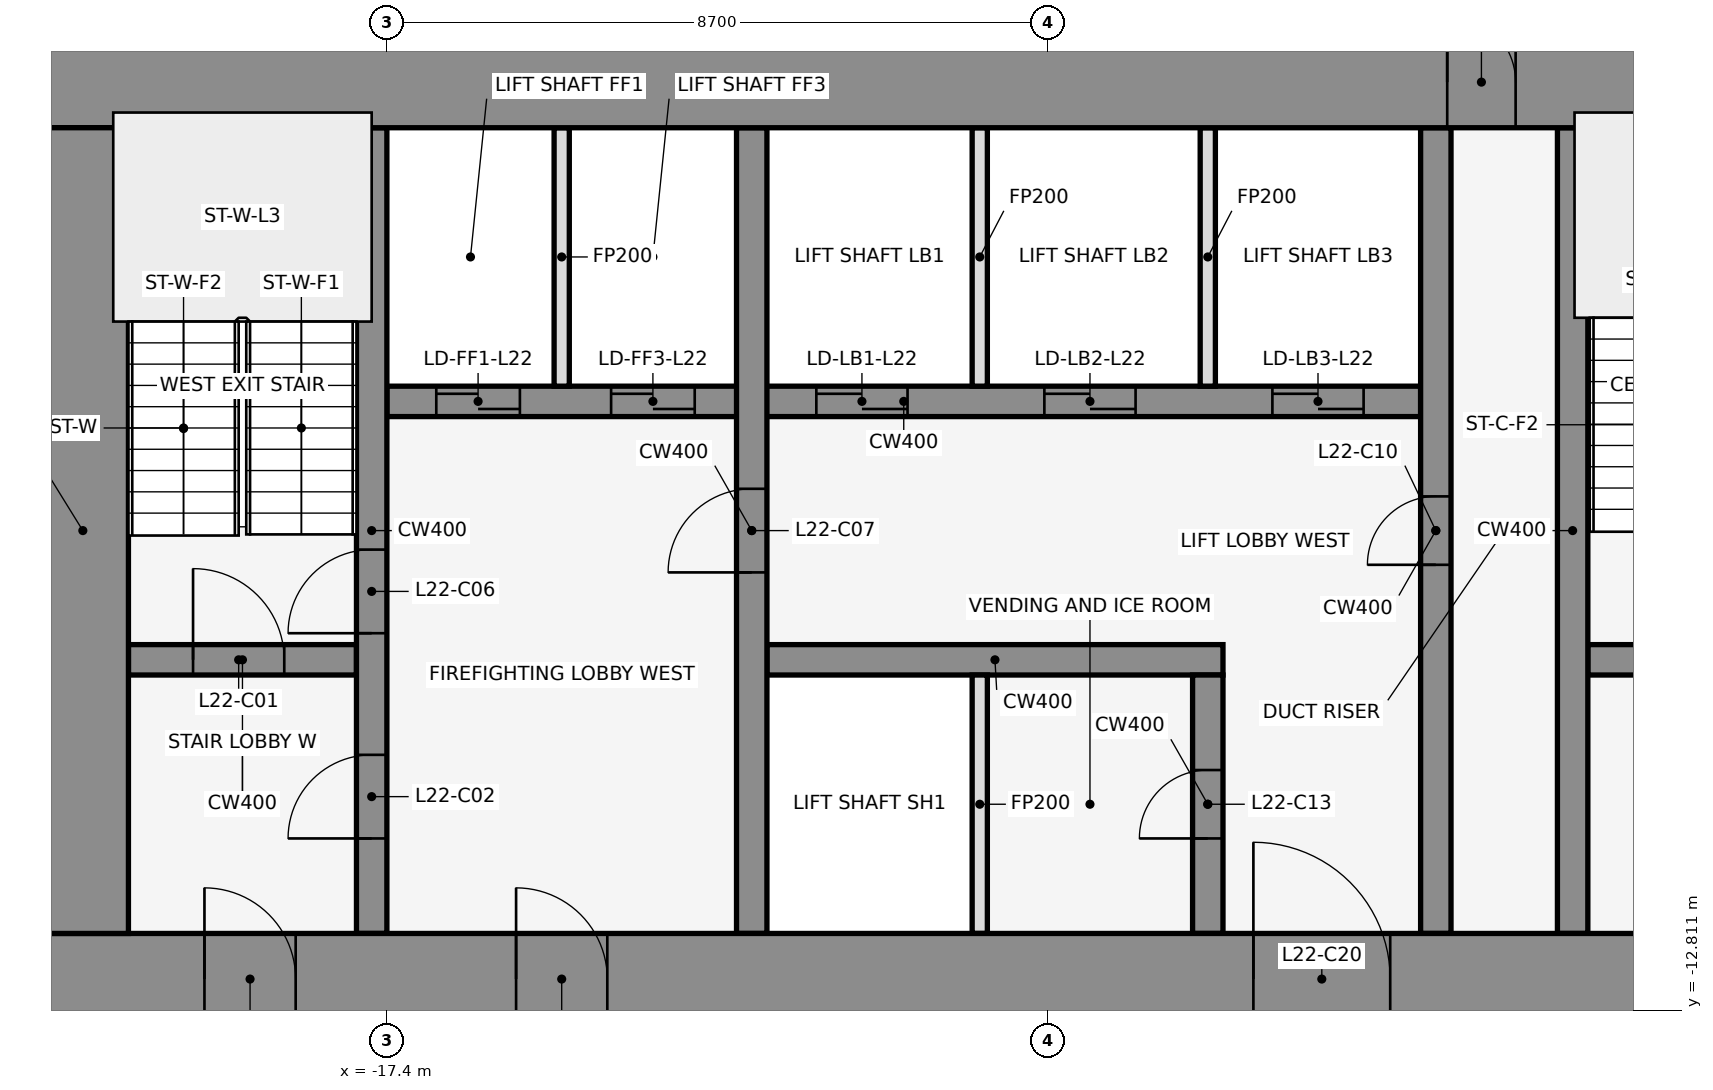
"""IFC4 building model, lengths in metres.
Left out: names, types, materials, properties, quantities, classifications, styles, units other than length and angle.
Written with IfcOpenShell. Run it as: python <this file> out.ifc"""

import sys

from ifc_helpers import new_model, si_unit, direction, frame, frame_2d, origin, place, context, subcontext, project, spatial, rectangle, extrude, element, fill, save


model = new_model("IFC4")
c1 = context("Model", 3, precision=1e-05, world=origin(), true_north=direction((0.0, 1.0)))
c2 = subcontext(c1, "Body", "Model", "MODEL_VIEW")
j1 = project(units=[si_unit("LENGTHUNIT", "METRE"), si_unit("PLANEANGLEUNIT", "RADIAN")], contexts=[c1])
p1 = place(None, origin())
s1 = spatial("IfcSite", under=j1, at=p1, CompositionType="ELEMENT")
p2 = place(p1, origin())
s2 = spatial("IfcBuilding", under=s1, at=p2, CompositionType="ELEMENT")
p3 = place(p2, frame((0.0, 0.0, 106.3)))
s3 = spatial("IfcBuildingStorey", under=s2, at=p3, CompositionType="ELEMENT", Elevation=106.3)
for number, where, z_axis, x_axis in (
    (1, (-0.068, -0.105, 0.0), (0.0, 0.0, 1.0), (-0.84, 0.543, 0.0)),
    (2, (-14.599, 1.08, 0.0), (0.0, 0.0, 1.0), (-0.84, -0.543, 0.0)),
):
    element("IfcWall", number, at=place(p3, frame(where, z_axis=z_axis, x_axis=x_axis)), inside=s3, PredefinedType="STANDARD", context=c2, shape_type="SweptSolid", body=[
        extrude(rectangle(XDim=2.183, YDim=0.25, at=frame_2d((1.091, 0.0))), origin(), (0.0, 0.0, 1.0), 3.95),
    ])
p4 = place(p3, frame((-20.8, -8.2, 0.0), z_axis=(0.0, 0.0, 1.0), x_axis=(1.0, 0.0, 0.0)))
e3 = element("IfcWall", 3, at=p4, inside=s3, PredefinedType="SHEAR", context=c2, shape_type="SweptSolid", body=[
    extrude(rectangle(XDim=3.0, YDim=0.4, at=frame_2d((1.5, 0.0))), origin(), (0.0, 0.0, 1.0), 4.1),
])
p5 = place(p4, frame((0.85, 0.0, 0.0)))
e4 = element("IfcOpeningElement", 4, at=p5, cuts=e3, PredefinedType="OPENING", context=c2, shape_type="SweptSolid", body=[
    extrude(rectangle(XDim=1.2, YDim=2.1, at=frame_2d((0.6, 1.05))), frame((0.0, 0.212, 0.0), z_axis=(0.0, -1.0, 0.0), x_axis=(1.0, 0.0, 0.0)), (0.0, 0.0, 1.0), 0.424),
])
p6 = place(p3, frame((-12.4, -8.2, 0.0), z_axis=(0.0, 0.0, 1.0), x_axis=(1.0, 0.0, 0.0)))
e5 = element("IfcWall", 5, at=p6, inside=s3, PredefinedType="SHEAR", context=c2, shape_type="SweptSolid", body=[
    extrude(rectangle(XDim=6.0, YDim=0.4, at=frame_2d((3.0, 0.0))), origin(), (0.0, 0.0, 1.0), 4.1),
])
p7 = place(p3, frame((-1.6, -8.2, 0.0), z_axis=(0.0, 0.0, 1.0), x_axis=(1.0, 0.0, 0.0)))
e6 = element("IfcWall", 6, at=p7, inside=s3, PredefinedType="SHEAR", context=c2, shape_type="SweptSolid", body=[
    extrude(rectangle(XDim=3.2, YDim=0.4, at=frame_2d((1.6, 0.0))), origin(), (0.0, 0.0, 1.0), 4.1),
])
p8 = place(p7, frame((1.05, 0.0, 0.0)))
e7 = element("IfcOpeningElement", 7, at=p8, cuts=e6, PredefinedType="OPENING", context=c2, shape_type="SweptSolid", body=[
    extrude(rectangle(XDim=1.2, YDim=2.1, at=frame_2d((0.6, 1.05))), frame((0.0, 0.212, 0.0), z_axis=(0.0, -1.0, 0.0), x_axis=(1.0, 0.0, 0.0)), (0.0, 0.0, 1.0), 0.424),
])
p9 = place(p3, frame((-17.4, -4.8, 0.0), z_axis=(0.0, 0.0, 1.0), x_axis=(1.0, 0.0, 0.0)))
e8 = element("IfcWall", 8, at=p9, inside=s3, PredefinedType="SHEAR", context=c2, shape_type="SweptSolid", body=[
    extrude(rectangle(XDim=13.6, YDim=0.4, at=frame_2d((6.8, 0.0))), origin(), (0.0, 0.0, 1.0), 4.1),
])
p10 = place(p9, frame((0.65, 0.0, 0.0)))
e9 = element("IfcOpeningElement", 9, at=p10, cuts=e8, PredefinedType="OPENING", context=c2, shape_type="SweptSolid", body=[
    extrude(rectangle(XDim=1.1, YDim=2.1, at=frame_2d((0.55, 1.05))), frame((0.0, 0.212, 0.0), z_axis=(0.0, -1.0, 0.0), x_axis=(1.0, 0.0, 0.0)), (0.0, 0.0, 1.0), 0.424),
])
p11 = place(p9, frame((2.95, 0.0, 0.0)))
e10 = element("IfcOpeningElement", 10, at=p11, cuts=e8, PredefinedType="OPENING", context=c2, shape_type="SweptSolid", body=[
    extrude(rectangle(XDim=1.1, YDim=2.1, at=frame_2d((0.55, 1.05))), frame((0.0, 0.212, 0.0), z_axis=(0.0, -1.0, 0.0), x_axis=(1.0, 0.0, 0.0)), (0.0, 0.0, 1.0), 0.424),
])
p12 = place(p9, frame((5.65, 0.0, 0.0)))
e11 = element("IfcOpeningElement", 11, at=p12, cuts=e8, PredefinedType="OPENING", context=c2, shape_type="SweptSolid", body=[
    extrude(rectangle(XDim=1.2, YDim=2.1, at=frame_2d((0.6, 1.05))), frame((0.0, 0.212, 0.0), z_axis=(0.0, -1.0, 0.0), x_axis=(1.0, 0.0, 0.0)), (0.0, 0.0, 1.0), 0.424),
])
p13 = place(p9, frame((8.65, 0.0, 0.0)))
e12 = element("IfcOpeningElement", 12, at=p13, cuts=e8, PredefinedType="OPENING", context=c2, shape_type="SweptSolid", body=[
    extrude(rectangle(XDim=1.2, YDim=2.1, at=frame_2d((0.6, 1.05))), frame((0.0, 0.212, 0.0), z_axis=(0.0, -1.0, 0.0), x_axis=(1.0, 0.0, 0.0)), (0.0, 0.0, 1.0), 0.424),
])
p14 = place(p9, frame((11.65, 0.0, 0.0)))
e13 = element("IfcOpeningElement", 13, at=p14, cuts=e8, PredefinedType="OPENING", context=c2, shape_type="SweptSolid", body=[
    extrude(rectangle(XDim=1.2, YDim=2.1, at=frame_2d((0.6, 1.05))), frame((0.0, 0.212, 0.0), z_axis=(0.0, -1.0, 0.0), x_axis=(1.0, 0.0, 0.0)), (0.0, 0.0, 1.0), 0.424),
])
p15 = place(p3, frame((-17.6, -11.8, 0.0), z_axis=(0.0, 0.0, 1.0), x_axis=(0.0, 1.0, 0.0)))
e14 = element("IfcWall", 14, at=p15, inside=s3, PredefinedType="SHEAR", context=c2, shape_type="SweptSolid", body=[
    extrude(rectangle(XDim=10.6, YDim=0.4, at=frame_2d((5.3, 0.0))), origin(), (0.0, 0.0, 1.0), 4.1),
])
p16 = place(p15, frame((1.25, 0.0, 0.0)))
e15 = element("IfcOpeningElement", 15, at=p16, cuts=e14, PredefinedType="OPENING", context=c2, shape_type="SweptSolid", body=[
    extrude(rectangle(XDim=1.1, YDim=2.1, at=frame_2d((0.55, 1.05))), frame((0.0, 0.212, 0.0), z_axis=(0.0, -1.0, 0.0), x_axis=(1.0, 0.0, 0.0)), (0.0, 0.0, 1.0), 0.424),
])
p17 = place(p15, frame((3.95, 0.0, 0.0)))
e16 = element("IfcOpeningElement", 16, at=p17, cuts=e14, PredefinedType="OPENING", context=c2, shape_type="SweptSolid", body=[
    extrude(rectangle(XDim=1.1, YDim=2.1, at=frame_2d((0.55, 1.05))), frame((0.0, 0.212, 0.0), z_axis=(0.0, -1.0, 0.0), x_axis=(1.0, 0.0, 0.0)), (0.0, 0.0, 1.0), 0.424),
])
p18 = place(p3, frame((-15.1, -4.6, 0.0), z_axis=(0.0, 0.0, 1.0), x_axis=(0.0, 1.0, 0.0)))
e17 = element("IfcWall", 17, at=p18, inside=s3, PredefinedType="PARTITIONING", context=c2, shape_type="SweptSolid", body=[
    extrude(rectangle(XDim=3.4, YDim=0.2, at=frame_2d((1.7, 0.0))), origin(), (0.0, 0.0, 1.0), 3.018),
])
p19 = place(p3, frame((-12.6, -11.8, 0.0), z_axis=(0.0, 0.0, 1.0), x_axis=(0.0, 1.0, 0.0)))
e18 = element("IfcWall", 18, at=p19, inside=s3, PredefinedType="SHEAR", context=c2, shape_type="SweptSolid", body=[
    extrude(rectangle(XDim=10.6, YDim=0.4, at=frame_2d((5.3, 0.0))), origin(), (0.0, 0.0, 1.0), 4.1),
])
p20 = place(p19, frame((4.75, 0.0, 0.0)))
e19 = element("IfcOpeningElement", 19, at=p20, cuts=e18, PredefinedType="OPENING", context=c2, shape_type="SweptSolid", body=[
    extrude(rectangle(XDim=1.1, YDim=2.1, at=frame_2d((0.55, 1.05))), frame((0.0, 0.212, 0.0), z_axis=(0.0, -1.0, 0.0), x_axis=(1.0, 0.0, 0.0)), (0.0, 0.0, 1.0), 0.424),
])
for number, where, z_axis, x_axis in (
    (20, (-9.6, -11.8, 0.0), (0.0, 0.0, 1.0), (0.0, 1.0, 0.0)),
    (21, (-9.6, -4.6, 0.0), (0.0, 0.0, 1.0), (0.0, 1.0, 0.0)),
):
    element("IfcWall", number, at=place(p3, frame(where, z_axis=z_axis, x_axis=x_axis)), inside=s3, PredefinedType="PARTITIONING", context=c2, shape_type="SweptSolid", body=[
        extrude(rectangle(XDim=3.4, YDim=0.2, at=frame_2d((1.7, 0.0))), origin(), (0.0, 0.0, 1.0), 3.018),
    ])
p21 = place(p3, frame((-6.6, -11.8, 0.0), z_axis=(0.0, 0.0, 1.0), x_axis=(0.0, 1.0, 0.0)))
e22 = element("IfcWall", 22, at=p21, inside=s3, PredefinedType="SHEAR", context=c2, shape_type="SweptSolid", body=[
    extrude(rectangle(XDim=3.4, YDim=0.4, at=frame_2d((1.7, 0.0))), origin(), (0.0, 0.0, 1.0), 4.1),
])
p22 = place(p21, frame((1.25, 0.0, 0.0)))
e23 = element("IfcOpeningElement", 23, at=p22, cuts=e22, PredefinedType="OPENING", context=c2, shape_type="SweptSolid", body=[
    extrude(rectangle(XDim=0.9, YDim=2.1, at=frame_2d((0.45, 1.05))), frame((0.0, 0.212, 0.0), z_axis=(0.0, -1.0, 0.0), x_axis=(1.0, 0.0, 0.0)), (0.0, 0.0, 1.0), 0.424),
])
p23 = place(p3, frame((-6.6, -4.6, 0.0), z_axis=(0.0, 0.0, 1.0), x_axis=(0.0, 1.0, 0.0)))
e24 = element("IfcWall", 24, at=p23, inside=s3, PredefinedType="PARTITIONING", context=c2, shape_type="SweptSolid", body=[
    extrude(rectangle(XDim=3.4, YDim=0.2, at=frame_2d((1.7, 0.0))), origin(), (0.0, 0.0, 1.0), 3.018),
])
p24 = place(p3, frame((-3.6, -11.8, 0.0), z_axis=(0.0, 0.0, 1.0), x_axis=(0.0, 1.0, 0.0)))
e25 = element("IfcWall", 25, at=p24, inside=s3, PredefinedType="SHEAR", context=c2, shape_type="SweptSolid", body=[
    extrude(rectangle(XDim=10.6, YDim=0.4, at=frame_2d((5.3, 0.0))), origin(), (0.0, 0.0, 1.0), 4.1),
])
p25 = place(p24, frame((4.85, 0.0, 0.0)))
e26 = element("IfcOpeningElement", 26, at=p25, cuts=e25, PredefinedType="OPENING", context=c2, shape_type="SweptSolid", body=[
    extrude(rectangle(XDim=0.9, YDim=2.1, at=frame_2d((0.45, 1.05))), frame((0.0, 0.212, 0.0), z_axis=(0.0, -1.0, 0.0), x_axis=(1.0, 0.0, 0.0)), (0.0, 0.0, 1.0), 0.424),
])
p26 = place(p3, frame((-1.8, -11.8, 0.0), z_axis=(0.0, 0.0, 1.0), x_axis=(0.0, 1.0, 0.0)))
e27 = element("IfcWall", 27, at=p26, inside=s3, PredefinedType="SHEAR", context=c2, shape_type="SweptSolid", body=[
    extrude(rectangle(XDim=10.6, YDim=0.4, at=frame_2d((5.3, 0.0))), origin(), (0.0, 0.0, 1.0), 4.1),
])
p27 = place(p3, frame((-22.0, -0.6, 0.0), z_axis=(0.0, 0.0, 1.0), x_axis=(1.0, 0.0, 0.0)))
e28 = element("IfcWall", 28, at=p27, inside=s3, PredefinedType="SHEAR", context=c2, shape_type="SweptSolid", body=[
    extrude(rectangle(XDim=44.0, YDim=1.2, at=frame_2d((22.0, 0.0))), origin(), (0.0, 0.0, 1.0), 4.1),
])
p28 = place(p27, frame((18.55, 0.0, 0.0)))
e29 = element("IfcOpeningElement", 29, at=p28, cuts=e28, PredefinedType="OPENING", context=c2, shape_type="SweptSolid", body=[
    extrude(rectangle(XDim=0.9, YDim=2.1, at=frame_2d((0.45, 1.05))), frame((0.0, 0.612, 0.0), z_axis=(0.0, -1.0, 0.0), x_axis=(1.0, 0.0, 0.0)), (0.0, 0.0, 1.0), 1.224),
])
p29 = place(p27, frame((24.55, 0.0, 0.0)))
e30 = element("IfcOpeningElement", 30, at=p29, cuts=e28, PredefinedType="OPENING", context=c2, shape_type="SweptSolid", body=[
    extrude(rectangle(XDim=0.9, YDim=2.1, at=frame_2d((0.45, 1.05))), frame((0.0, 0.612, 0.0), z_axis=(0.0, -1.0, 0.0), x_axis=(1.0, 0.0, 0.0)), (0.0, 0.0, 1.0), 1.224),
])
p30 = place(p3, frame((-22.0, -12.4, 0.0), z_axis=(0.0, 0.0, 1.0), x_axis=(1.0, 0.0, 0.0)))
e31 = element("IfcWall", 31, at=p30, inside=s3, PredefinedType="SHEAR", context=c2, shape_type="SweptSolid", body=[
    extrude(rectangle(XDim=44.0, YDim=1.2, at=frame_2d((22.0, 0.0))), origin(), (0.0, 0.0, 1.0), 4.1),
])
p31 = place(p30, frame((2.2, 0.0, 0.0)))
e32 = element("IfcOpeningElement", 32, at=p31, cuts=e31, PredefinedType="OPENING", context=c2, shape_type="SweptSolid", body=[
    extrude(rectangle(XDim=1.2, YDim=2.1, at=frame_2d((0.6, 1.05))), frame((0.0, 0.612, 0.0), z_axis=(0.0, -1.0, 0.0), x_axis=(1.0, 0.0, 0.0)), (0.0, 0.0, 1.0), 1.224),
])
p32 = place(p30, frame((21.4, 0.0, 0.0)))
e33 = element("IfcOpeningElement", 33, at=p32, cuts=e31, PredefinedType="OPENING", context=c2, shape_type="SweptSolid", body=[
    extrude(rectangle(XDim=1.2, YDim=2.1, at=frame_2d((0.6, 1.05))), frame((0.0, 0.612, 0.0), z_axis=(0.0, -1.0, 0.0), x_axis=(1.0, 0.0, 0.0)), (0.0, 0.0, 1.0), 1.224),
])
p33 = place(p30, frame((40.6, 0.0, 0.0)))
e34 = element("IfcOpeningElement", 34, at=p33, cuts=e31, PredefinedType="OPENING", context=c2, shape_type="SweptSolid", body=[
    extrude(rectangle(XDim=1.2, YDim=2.1, at=frame_2d((0.6, 1.05))), frame((0.0, 0.612, 0.0), z_axis=(0.0, -1.0, 0.0), x_axis=(1.0, 0.0, 0.0)), (0.0, 0.0, 1.0), 1.224),
])
p34 = place(p30, frame((16.0, 0.0, 0.0)))
e35 = element("IfcOpeningElement", 35, at=p34, cuts=e31, PredefinedType="OPENING", context=c2, shape_type="SweptSolid", body=[
    extrude(rectangle(XDim=1.8, YDim=2.1, at=frame_2d((0.9, 1.05))), frame((0.0, 0.612, 0.0), z_axis=(0.0, -1.0, 0.0), x_axis=(1.0, 0.0, 0.0)), (0.0, 0.0, 1.0), 1.224),
])
p35 = place(p30, frame((6.3, 0.0, 0.0)))
e36 = element("IfcOpeningElement", 36, at=p35, cuts=e31, PredefinedType="OPENING", context=c2, shape_type="SweptSolid", body=[
    extrude(rectangle(XDim=1.2, YDim=2.1, at=frame_2d((0.6, 1.05))), frame((0.0, 0.612, 0.0), z_axis=(0.0, -1.0, 0.0), x_axis=(1.0, 0.0, 0.0)), (0.0, 0.0, 1.0), 1.224),
])
p36 = place(p30, frame((26.2, 0.0, 0.0)))
e37 = element("IfcOpeningElement", 37, at=p36, cuts=e31, PredefinedType="OPENING", context=c2, shape_type="SweptSolid", body=[
    extrude(rectangle(XDim=1.8, YDim=2.1, at=frame_2d((0.9, 1.05))), frame((0.0, 0.612, 0.0), z_axis=(0.0, -1.0, 0.0), x_axis=(1.0, 0.0, 0.0)), (0.0, 0.0, 1.0), 1.224),
])
p37 = place(p30, frame((36.5, 0.0, 0.0)))
e38 = element("IfcOpeningElement", 38, at=p37, cuts=e31, PredefinedType="OPENING", context=c2, shape_type="SweptSolid", body=[
    extrude(rectangle(XDim=1.2, YDim=2.1, at=frame_2d((0.6, 1.05))), frame((0.0, 0.612, 0.0), z_axis=(0.0, -1.0, 0.0), x_axis=(1.0, 0.0, 0.0)), (0.0, 0.0, 1.0), 1.224),
])
p38 = place(p3, frame((-21.4, -11.8, 0.0), z_axis=(0.0, 0.0, 1.0), x_axis=(0.0, 1.0, 0.0)))
e39 = element("IfcWall", 39, at=p38, inside=s3, PredefinedType="SHEAR", context=c2, shape_type="SweptSolid", body=[
    extrude(rectangle(XDim=10.6, YDim=1.2, at=frame_2d((5.3, 0.0))), origin(), (0.0, 0.0, 1.0), 4.1),
])
p39 = place(p5, origin())
e40 = element("IfcDoor", 40, at=p39, inside=s3, OperationType="SINGLE_SWING_LEFT", PredefinedType="DOOR", context=c2, shape_type="SweptSolid", body=[
    extrude(rectangle(XDim=1.2, YDim=2.1, at=frame_2d((0.6, 1.05))), frame((0.0, 0.025, 0.0), z_axis=(0.0, -1.0, 0.0), x_axis=(1.0, 0.0, 0.0)), (0.0, 0.0, 1.0), 0.05),
])
fill(e4, e40)
p40 = place(p16, frame((1.1, 0.0, 0.0), z_axis=(0.0, 0.0, 1.0), x_axis=(-1.0, 0.0, 0.0)))
e41 = element("IfcDoor", 41, at=p40, inside=s3, OperationType="SINGLE_SWING_LEFT", PredefinedType="DOOR", context=c2, shape_type="SweptSolid", body=[
    extrude(rectangle(XDim=1.1, YDim=2.1, at=frame_2d((0.55, 1.05))), frame((0.0, 0.025, 0.0), z_axis=(0.0, -1.0, 0.0), x_axis=(1.0, 0.0, 0.0)), (0.0, 0.0, 1.0), 0.05),
])
fill(e15, e41)
p41 = place(p10, origin())
e42 = element("IfcDoor", 42, at=p41, inside=s3, OperationType="DOUBLE_DOOR_SLIDING", PredefinedType="DOOR", context=c2, shape_type="SweptSolid", body=[
    extrude(rectangle(XDim=1.1, YDim=2.1, at=frame_2d((0.55, 1.05))), frame((0.0, 0.025, 0.0), z_axis=(0.0, -1.0, 0.0), x_axis=(1.0, 0.0, 0.0)), (0.0, 0.0, 1.0), 0.05),
])
fill(e9, e42)
p42 = place(p11, origin())
e43 = element("IfcDoor", 43, at=p42, inside=s3, OperationType="DOUBLE_DOOR_SLIDING", PredefinedType="DOOR", context=c2, shape_type="SweptSolid", body=[
    extrude(rectangle(XDim=1.1, YDim=2.1, at=frame_2d((0.55, 1.05))), frame((0.0, 0.025, 0.0), z_axis=(0.0, -1.0, 0.0), x_axis=(1.0, 0.0, 0.0)), (0.0, 0.0, 1.0), 0.05),
])
fill(e10, e43)
p43 = place(p12, origin())
e44 = element("IfcDoor", 44, at=p43, inside=s3, OperationType="DOUBLE_DOOR_SLIDING", PredefinedType="DOOR", context=c2, shape_type="SweptSolid", body=[
    extrude(rectangle(XDim=1.2, YDim=2.1, at=frame_2d((0.6, 1.05))), frame((0.0, 0.025, 0.0), z_axis=(0.0, -1.0, 0.0), x_axis=(1.0, 0.0, 0.0)), (0.0, 0.0, 1.0), 0.05),
])
fill(e11, e44)
p44 = place(p13, origin())
e45 = element("IfcDoor", 45, at=p44, inside=s3, OperationType="DOUBLE_DOOR_SLIDING", PredefinedType="DOOR", context=c2, shape_type="SweptSolid", body=[
    extrude(rectangle(XDim=1.2, YDim=2.1, at=frame_2d((0.6, 1.05))), frame((0.0, 0.025, 0.0), z_axis=(0.0, -1.0, 0.0), x_axis=(1.0, 0.0, 0.0)), (0.0, 0.0, 1.0), 0.05),
])
fill(e12, e45)
p45 = place(p14, origin())
e46 = element("IfcDoor", 46, at=p45, inside=s3, OperationType="DOUBLE_DOOR_SLIDING", PredefinedType="DOOR", context=c2, shape_type="SweptSolid", body=[
    extrude(rectangle(XDim=1.2, YDim=2.1, at=frame_2d((0.6, 1.05))), frame((0.0, 0.025, 0.0), z_axis=(0.0, -1.0, 0.0), x_axis=(1.0, 0.0, 0.0)), (0.0, 0.0, 1.0), 0.05),
])
fill(e13, e46)
p46 = place(p17, frame((1.1, 0.0, 0.0), z_axis=(0.0, 0.0, 1.0), x_axis=(-1.0, 0.0, 0.0)))
e47 = element("IfcDoor", 47, at=p46, inside=s3, OperationType="SINGLE_SWING_LEFT", PredefinedType="DOOR", context=c2, shape_type="SweptSolid", body=[
    extrude(rectangle(XDim=1.1, YDim=2.1, at=frame_2d((0.55, 1.05))), frame((0.0, 0.025, 0.0), z_axis=(0.0, -1.0, 0.0), x_axis=(1.0, 0.0, 0.0)), (0.0, 0.0, 1.0), 0.05),
])
fill(e16, e47)
p47 = place(p20, origin())
e48 = element("IfcDoor", 48, at=p47, inside=s3, OperationType="SINGLE_SWING_LEFT", PredefinedType="DOOR", context=c2, shape_type="SweptSolid", body=[
    extrude(rectangle(XDim=1.1, YDim=2.1, at=frame_2d((0.55, 1.05))), frame((0.0, 0.025, 0.0), z_axis=(0.0, -1.0, 0.0), x_axis=(1.0, 0.0, 0.0)), (0.0, 0.0, 1.0), 0.05),
])
fill(e19, e48)
p48 = place(p25, frame((0.9, 0.0, 0.0), z_axis=(0.0, 0.0, 1.0), x_axis=(-1.0, 0.0, 0.0)))
e49 = element("IfcDoor", 49, at=p48, inside=s3, OperationType="SINGLE_SWING_LEFT", PredefinedType="DOOR", context=c2, shape_type="SweptSolid", body=[
    extrude(rectangle(XDim=0.9, YDim=2.1, at=frame_2d((0.45, 1.05))), frame((0.0, 0.025, 0.0), z_axis=(0.0, -1.0, 0.0), x_axis=(1.0, 0.0, 0.0)), (0.0, 0.0, 1.0), 0.05),
])
fill(e26, e49)
p49 = place(p22, origin())
e50 = element("IfcDoor", 50, at=p49, inside=s3, OperationType="SINGLE_SWING_LEFT", PredefinedType="DOOR", context=c2, shape_type="SweptSolid", body=[
    extrude(rectangle(XDim=0.9, YDim=2.1, at=frame_2d((0.45, 1.05))), frame((0.0, 0.025, 0.0), z_axis=(0.0, -1.0, 0.0), x_axis=(1.0, 0.0, 0.0)), (0.0, 0.0, 1.0), 0.05),
])
fill(e23, e50)
p50 = place(p28, origin())
e51 = element("IfcDoor", 51, at=p50, inside=s3, OperationType="SINGLE_SWING_LEFT", PredefinedType="DOOR", context=c2, shape_type="SweptSolid", body=[
    extrude(rectangle(XDim=0.9, YDim=2.1, at=frame_2d((0.45, 1.05))), frame((0.0, 0.025, 0.0), z_axis=(0.0, -1.0, 0.0), x_axis=(1.0, 0.0, 0.0)), (0.0, 0.0, 1.0), 0.05),
])
fill(e29, e51)
p51 = place(p31, frame((1.2, 0.0, 0.0), z_axis=(0.0, 0.0, 1.0), x_axis=(-1.0, 0.0, 0.0)))
e52 = element("IfcDoor", 52, at=p51, inside=s3, OperationType="SINGLE_SWING_RIGHT", PredefinedType="DOOR", context=c2, shape_type="SweptSolid", body=[
    extrude(rectangle(XDim=1.2, YDim=2.1, at=frame_2d((0.6, 1.05))), frame((0.0, 0.025, 0.0), z_axis=(0.0, -1.0, 0.0), x_axis=(1.0, 0.0, 0.0)), (0.0, 0.0, 1.0), 0.05),
])
fill(e32, e52)
p52 = place(p34, origin())
e53 = element("IfcDoor", 53, at=p52, inside=s3, OperationType="SINGLE_SWING_LEFT", PredefinedType="DOOR", context=c2, shape_type="SweptSolid", body=[
    extrude(rectangle(XDim=1.8, YDim=2.1, at=frame_2d((0.9, 1.05))), frame((0.0, 0.025, 0.0), z_axis=(0.0, -1.0, 0.0), x_axis=(1.0, 0.0, 0.0)), (0.0, 0.0, 1.0), 0.05),
])
fill(e35, e53)
p53 = place(p35, frame((1.2, 0.0, 0.0), z_axis=(0.0, 0.0, 1.0), x_axis=(-1.0, 0.0, 0.0)))
e54 = element("IfcDoor", 54, at=p53, inside=s3, OperationType="SINGLE_SWING_RIGHT", PredefinedType="DOOR", context=c2, shape_type="SweptSolid", body=[
    extrude(rectangle(XDim=1.2, YDim=2.1, at=frame_2d((0.6, 1.05))), frame((0.0, 0.025, 0.0), z_axis=(0.0, -1.0, 0.0), x_axis=(1.0, 0.0, 0.0)), (0.0, 0.0, 1.0), 0.05),
])
fill(e36, e54)
save(model, sys.argv[1])
